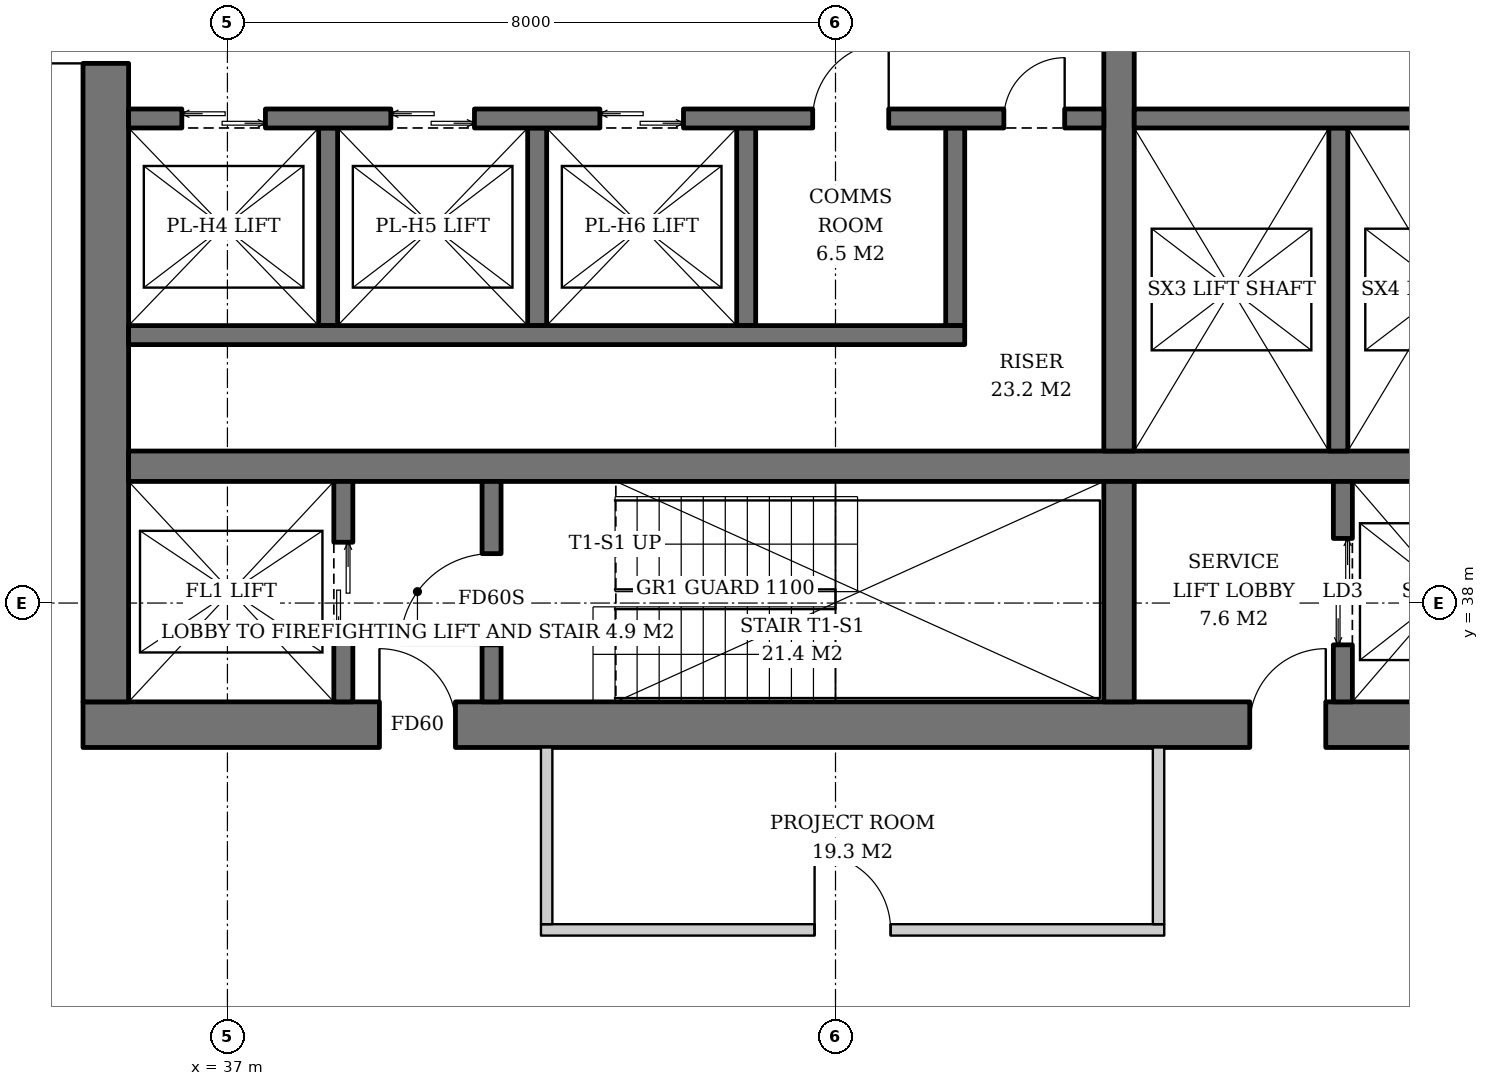
"""IFC4 building model, lengths in metres.
Left out: names, types, materials, properties, quantities, classifications, styles, units other than length and angle.
Written with IfcOpenShell. Run it as: python <this file> out.ifc"""

import sys

from ifc_helpers import new_model, si_unit, direction, frame, frame_2d, origin, place, context, subcontext, project, spatial, rectangle, extrude, element, fill, save


model = new_model("IFC4")
c1 = context("Model", 3, precision=1e-05, world=origin(), true_north=direction((0.0, 1.0)))
c2 = subcontext(c1, "Body", "Model", "MODEL_VIEW")
j1 = project(units=[si_unit("LENGTHUNIT", "METRE"), si_unit("PLANEANGLEUNIT", "RADIAN")], contexts=[c1])
p1 = place(None, origin())
s1 = spatial("IfcSite", under=j1, at=p1, CompositionType="ELEMENT")
p2 = place(p1, origin())
s2 = spatial("IfcBuilding", under=s1, at=p2, CompositionType="ELEMENT")
p3 = place(p2, frame((0.0, 0.0, 211.0)))
s3 = spatial("IfcBuildingStorey", under=s2, at=p3, CompositionType="ELEMENT", Elevation=211.0)
p4 = place(p3, frame((35.1, 36.4, 0.0), z_axis=(0.0, 0.0, 1.0), x_axis=(1.0, 0.0, 0.0)))
e1 = element("IfcWall", 1, at=p4, inside=s3, PredefinedType="SHEAR", context=c2, shape_type="SweptSolid", body=[
    extrude(rectangle(XDim=19.8, YDim=0.6, at=frame_2d((9.9, 0.0))), origin(), (0.0, 0.0, 1.0), 3.8),
])
p5 = place(p4, frame((3.9, 0.0, 0.0)))
e2 = element("IfcOpeningElement", 2, at=p5, cuts=e1, PredefinedType="OPENING", context=c2, shape_type="SweptSolid", body=[
    extrude(rectangle(XDim=1.0, YDim=2.1, at=frame_2d((0.5, 1.05))), frame((0.0, 0.31, 0.0), z_axis=(0.0, -1.0, 0.0), x_axis=(1.0, 0.0, 0.0)), (0.0, 0.0, 1.0), 0.62),
])
p6 = place(p4, frame((15.35, 0.0, 0.0)))
e3 = element("IfcOpeningElement", 3, at=p6, cuts=e1, PredefinedType="OPENING", context=c2, shape_type="SweptSolid", body=[
    extrude(rectangle(XDim=1.0, YDim=2.1, at=frame_2d((0.5, 1.05))), frame((0.0, 0.31, 0.0), z_axis=(0.0, -1.0, 0.0), x_axis=(1.0, 0.0, 0.0)), (0.0, 0.0, 1.0), 0.62),
])
p7 = place(p3, frame((35.4, 36.7, 0.0), z_axis=(0.0, 0.0, 1.0), x_axis=(0.0, 1.0, 0.0)))
e4 = element("IfcWall", 4, at=p7, inside=s3, PredefinedType="SHEAR", context=c2, shape_type="SweptSolid", body=[
    extrude(rectangle(XDim=18.6, YDim=0.6, at=frame_2d((9.3, 0.0))), origin(), (0.0, 0.0, 1.0), 3.8),
])
p8 = place(p7, frame((8.4, 0.0, 0.0)))
e5 = element("IfcOpeningElement", 5, at=p8, cuts=e4, PredefinedType="OPENING", context=c2, shape_type="SweptSolid", body=[
    extrude(rectangle(XDim=1.8, YDim=2.4, at=frame_2d((0.9, 1.2))), frame((0.0, 0.31, 0.0), z_axis=(0.0, -1.0, 0.0), x_axis=(1.0, 0.0, 0.0)), (0.0, 0.0, 1.0), 0.62),
])
p9 = place(p3, frame((35.7, 39.8, 0.0), z_axis=(0.0, 0.0, 1.0), x_axis=(1.0, 0.0, 0.0)))
e6 = element("IfcWall", 6, at=p9, inside=s3, PredefinedType="SHEAR", context=c2, shape_type="SweptSolid", body=[
    extrude(rectangle(XDim=18.6, YDim=0.4, at=frame_2d((9.3, 0.0))), origin(), (0.0, 0.0, 1.0), 3.8),
])
p10 = place(p3, frame((48.73, 36.7, 0.0), z_axis=(0.0, 0.0, 1.0), x_axis=(0.0, 1.0, 0.0)))
e7 = element("IfcWall", 7, at=p10, inside=s3, PredefinedType="SHEAR", context=c2, shape_type="SweptSolid", body=[
    extrude(rectangle(XDim=2.9, YDim=0.4, at=frame_2d((1.45, 0.0))), origin(), (0.0, 0.0, 1.0), 3.8),
])
p11 = place(p3, frame((48.73, 40.0, 0.0), z_axis=(0.0, 0.0, 1.0), x_axis=(0.0, 1.0, 0.0)))
e8 = element("IfcWall", 8, at=p11, inside=s3, PredefinedType="SHEAR", context=c2, shape_type="SweptSolid", body=[
    extrude(rectangle(XDim=12.0, YDim=0.4, at=frame_2d((6.0, 0.0))), origin(), (0.0, 0.0, 1.0), 3.8),
])
p12 = place(p3, frame((38.525, 36.7, 0.0), z_axis=(0.0, 0.0, 1.0), x_axis=(0.0, 1.0, 0.0)))
e9 = element("IfcWall", 9, at=p12, inside=s3, PredefinedType="SHEAR", context=c2, shape_type="SweptSolid", body=[
    extrude(rectangle(XDim=2.9, YDim=0.25, at=frame_2d((1.45, 0.0))), origin(), (0.0, 0.0, 1.0), 3.8),
])
p13 = place(p12, frame((0.8, 0.0, 0.0)))
e10 = element("IfcOpeningElement", 10, at=p13, cuts=e9, PredefinedType="OPENING", context=c2, shape_type="SweptSolid", body=[
    extrude(rectangle(XDim=1.3, YDim=2.2, at=frame_2d((0.65, 1.1))), frame((0.0, 0.135, 0.0), z_axis=(0.0, -1.0, 0.0), x_axis=(1.0, 0.0, 0.0)), (0.0, 0.0, 1.0), 0.27),
])
p14 = place(p3, frame((40.475, 36.7, 0.0), z_axis=(0.0, 0.0, 1.0), x_axis=(0.0, 1.0, 0.0)))
e11 = element("IfcWall", 11, at=p14, inside=s3, PredefinedType="SHEAR", context=c2, shape_type="SweptSolid", body=[
    extrude(rectangle(XDim=2.9, YDim=0.25, at=frame_2d((1.45, 0.0))), origin(), (0.0, 0.0, 1.0), 3.8),
])
p15 = place(p14, frame((0.75, 0.0, 0.0)))
e12 = element("IfcOpeningElement", 12, at=p15, cuts=e11, PredefinedType="OPENING", context=c2, shape_type="SweptSolid", body=[
    extrude(rectangle(XDim=1.2, YDim=2.1, at=frame_2d((0.6, 1.05))), frame((0.0, 0.135, 0.0), z_axis=(0.0, -1.0, 0.0), x_axis=(1.0, 0.0, 0.0)), (0.0, 0.0, 1.0), 0.27),
])
p16 = place(p3, frame((51.675, 36.7, 0.0), z_axis=(0.0, 0.0, 1.0), x_axis=(0.0, 1.0, 0.0)))
e13 = element("IfcWall", 13, at=p16, inside=s3, PredefinedType="SHEAR", context=c2, shape_type="SweptSolid", body=[
    extrude(rectangle(XDim=2.9, YDim=0.25, at=frame_2d((1.45, 0.0))), origin(), (0.0, 0.0, 1.0), 3.8),
])
p17 = place(p16, frame((0.75, 0.0, 0.0)))
e14 = element("IfcOpeningElement", 14, at=p17, cuts=e13, PredefinedType="OPENING", context=c2, shape_type="SweptSolid", body=[
    extrude(rectangle(XDim=1.4, YDim=2.4, at=frame_2d((0.7, 1.2))), frame((0.0, 0.135, 0.0), z_axis=(0.0, -1.0, 0.0), x_axis=(1.0, 0.0, 0.0)), (0.0, 0.0, 1.0), 0.27),
])
for number, where, z_axis, x_axis in (
    (15, (38.325, 44.25, 0.0), (0.0, 0.0, 1.0), (0.0, -1.0, 0.0)),
    (16, (41.075, 44.25, 0.0), (0.0, 0.0, 1.0), (0.0, -1.0, 0.0)),
    (17, (43.825, 44.25, 0.0), (0.0, 0.0, 1.0), (0.0, -1.0, 0.0)),
    (18, (46.575, 44.25, 0.0), (0.0, 0.0, 1.0), (0.0, -1.0, 0.0)),
):
    element("IfcWall", number, at=place(p3, frame(where, z_axis=z_axis, x_axis=x_axis)), inside=s3, PredefinedType="SHEAR", context=c2, shape_type="SweptSolid", body=[
        extrude(rectangle(XDim=2.6, YDim=0.25, at=frame_2d((1.3, 0.0))), origin(), (0.0, 0.0, 1.0), 3.8),
    ])
p18 = place(p3, frame((35.7, 41.525, 0.0), z_axis=(0.0, 0.0, 1.0), x_axis=(1.0, 0.0, 0.0)))
e19 = element("IfcWall", 19, at=p18, inside=s3, PredefinedType="SHEAR", context=c2, shape_type="SweptSolid", body=[
    extrude(rectangle(XDim=11.0, YDim=0.25, at=frame_2d((5.5, 0.0))), origin(), (0.0, 0.0, 1.0), 3.8),
])
p19 = place(p3, frame((35.7, 44.375, 0.0), z_axis=(0.0, 0.0, 1.0), x_axis=(1.0, 0.0, 0.0)))
e20 = element("IfcWall", 20, at=p19, inside=s3, PredefinedType="SHEAR", context=c2, shape_type="SweptSolid", body=[
    extrude(rectangle(XDim=12.83, YDim=0.25, at=frame_2d((6.415, 0.0))), origin(), (0.0, 0.0, 1.0), 3.8),
])
p20 = place(p19, frame((0.7, 0.0, 0.0)))
e21 = element("IfcOpeningElement", 21, at=p20, cuts=e20, PredefinedType="OPENING", context=c2, shape_type="SweptSolid", body=[
    extrude(rectangle(XDim=1.1, YDim=2.2, at=frame_2d((0.55, 1.1))), frame((0.0, 0.135, 0.0), z_axis=(0.0, -1.0, 0.0), x_axis=(1.0, 0.0, 0.0)), (0.0, 0.0, 1.0), 0.27),
])
p21 = place(p19, frame((3.45, 0.0, 0.0)))
e22 = element("IfcOpeningElement", 22, at=p21, cuts=e20, PredefinedType="OPENING", context=c2, shape_type="SweptSolid", body=[
    extrude(rectangle(XDim=1.1, YDim=2.2, at=frame_2d((0.55, 1.1))), frame((0.0, 0.135, 0.0), z_axis=(0.0, -1.0, 0.0), x_axis=(1.0, 0.0, 0.0)), (0.0, 0.0, 1.0), 0.27),
])
p22 = place(p19, frame((6.2, 0.0, 0.0)))
e23 = element("IfcOpeningElement", 23, at=p22, cuts=e20, PredefinedType="OPENING", context=c2, shape_type="SweptSolid", body=[
    extrude(rectangle(XDim=1.1, YDim=2.2, at=frame_2d((0.55, 1.1))), frame((0.0, 0.135, 0.0), z_axis=(0.0, -1.0, 0.0), x_axis=(1.0, 0.0, 0.0)), (0.0, 0.0, 1.0), 0.27),
])
p23 = place(p19, frame((9.0, 0.0, 0.0)))
e24 = element("IfcOpeningElement", 24, at=p23, cuts=e20, PredefinedType="OPENING", context=c2, shape_type="SweptSolid", body=[
    extrude(rectangle(XDim=1.0, YDim=2.1, at=frame_2d((0.5, 1.05))), frame((0.0, 0.135, 0.0), z_axis=(0.0, -1.0, 0.0), x_axis=(1.0, 0.0, 0.0)), (0.0, 0.0, 1.0), 0.27),
])
p24 = place(p19, frame((11.515, 0.0, 0.0)))
e25 = element("IfcOpeningElement", 25, at=p24, cuts=e20, PredefinedType="OPENING", context=c2, shape_type="SweptSolid", body=[
    extrude(rectangle(XDim=0.8, YDim=2.0, at=frame_2d((0.4, 1.0))), frame((0.0, 0.135, 0.0), z_axis=(0.0, -1.0, 0.0), x_axis=(1.0, 0.0, 0.0)), (0.0, 0.0, 1.0), 0.27),
])
p25 = place(p3, frame((51.615, 44.25, 0.0), z_axis=(0.0, 0.0, 1.0), x_axis=(0.0, -1.0, 0.0)))
e26 = element("IfcWall", 26, at=p25, inside=s3, PredefinedType="SHEAR", context=c2, shape_type="SweptSolid", body=[
    extrude(rectangle(XDim=4.25, YDim=0.25, at=frame_2d((2.125, 0.0))), origin(), (0.0, 0.0, 1.0), 3.8),
])
p26 = place(p3, frame((48.93, 44.375, 0.0), z_axis=(0.0, 0.0, 1.0), x_axis=(1.0, 0.0, 0.0)))
e27 = element("IfcWall", 27, at=p26, inside=s3, PredefinedType="SHEAR", context=c2, shape_type="SweptSolid", body=[
    extrude(rectangle(XDim=5.37, YDim=0.25, at=frame_2d((2.685, 0.0))), origin(), (0.0, 0.0, 1.0), 3.8),
])
p27 = place(p3, frame((41.125, 33.7, 0.0), z_axis=(0.0, 0.0, 1.0), x_axis=(1.0, 0.0, 0.0)))
e28 = element("IfcWall", 28, at=p27, inside=s3, PredefinedType="PARTITIONING", context=c2, shape_type="SweptSolid", body=[
    extrude(rectangle(XDim=8.2, YDim=0.15, at=frame_2d((4.1, 0.0))), origin(), (0.0, 0.0, 1.0), 2.867),
])
p28 = place(p27, frame((3.6, 0.0, 0.0)))
e29 = element("IfcOpeningElement", 29, at=p28, cuts=e28, PredefinedType="OPENING", context=c2, shape_type="SweptSolid", body=[
    extrude(rectangle(XDim=1.0, YDim=2.1, at=frame_2d((0.5, 1.05))), frame((0.0, 0.085, 0.0), z_axis=(0.0, -1.0, 0.0), x_axis=(1.0, 0.0, 0.0)), (0.0, 0.0, 1.0), 0.17),
])
for number, where, z_axis, x_axis in (
    (30, (41.2, 36.1, 0.0), (0.0, 0.0, 1.0), (0.0, -1.0, 0.0)),
    (31, (49.25, 36.1, 0.0), (0.0, 0.0, 1.0), (0.0, -1.0, 0.0)),
):
    element("IfcWall", number, at=place(p3, frame(where, z_axis=z_axis, x_axis=x_axis)), inside=s3, PredefinedType="PARTITIONING", context=c2, shape_type="SweptSolid", body=[
        extrude(rectangle(XDim=2.325, YDim=0.15, at=frame_2d((1.163, 0.0))), origin(), (0.0, 0.0, 1.0), 3.62),
    ])
p29 = place(p13, origin())
e32 = element("IfcDoor", 32, at=p29, inside=s3, OperationType="DOUBLE_DOOR_SLIDING", PredefinedType="DOOR", context=c2, shape_type="SweptSolid", body=[
    extrude(rectangle(XDim=1.3, YDim=2.2, at=frame_2d((0.65, 1.1))), frame((0.0, 0.025, 0.0), z_axis=(0.0, -1.0, 0.0), x_axis=(1.0, 0.0, 0.0)), (0.0, 0.0, 1.0), 0.05),
])
fill(e10, e32)
p30 = place(p15, origin())
e33 = element("IfcDoor", 33, at=p30, inside=s3, OperationType="SINGLE_SWING_LEFT", PredefinedType="DOOR", context=c2, shape_type="SweptSolid", body=[
    extrude(rectangle(XDim=1.2, YDim=2.1, at=frame_2d((0.6, 1.05))), frame((0.0, 0.025, 0.0), z_axis=(0.0, -1.0, 0.0), x_axis=(1.0, 0.0, 0.0)), (0.0, 0.0, 1.0), 0.05),
])
fill(e12, e33)
p31 = place(p17, origin())
e34 = element("IfcDoor", 34, at=p31, inside=s3, OperationType="DOUBLE_DOOR_SLIDING", PredefinedType="DOOR", context=c2, shape_type="SweptSolid", body=[
    extrude(rectangle(XDim=1.4, YDim=2.4, at=frame_2d((0.7, 1.2))), frame((0.0, 0.025, 0.0), z_axis=(0.0, -1.0, 0.0), x_axis=(1.0, 0.0, 0.0)), (0.0, 0.0, 1.0), 0.05),
])
fill(e14, e34)
p32 = place(p20, origin())
e35 = element("IfcDoor", 35, at=p32, inside=s3, OperationType="DOUBLE_DOOR_SLIDING", PredefinedType="DOOR", context=c2, shape_type="SweptSolid", body=[
    extrude(rectangle(XDim=1.1, YDim=2.2, at=frame_2d((0.55, 1.1))), frame((0.0, 0.025, 0.0), z_axis=(0.0, -1.0, 0.0), x_axis=(1.0, 0.0, 0.0)), (0.0, 0.0, 1.0), 0.05),
])
fill(e21, e35)
p33 = place(p21, origin())
e36 = element("IfcDoor", 36, at=p33, inside=s3, OperationType="DOUBLE_DOOR_SLIDING", PredefinedType="DOOR", context=c2, shape_type="SweptSolid", body=[
    extrude(rectangle(XDim=1.1, YDim=2.2, at=frame_2d((0.55, 1.1))), frame((0.0, 0.025, 0.0), z_axis=(0.0, -1.0, 0.0), x_axis=(1.0, 0.0, 0.0)), (0.0, 0.0, 1.0), 0.05),
])
fill(e22, e36)
p34 = place(p22, origin())
e37 = element("IfcDoor", 37, at=p34, inside=s3, OperationType="DOUBLE_DOOR_SLIDING", PredefinedType="DOOR", context=c2, shape_type="SweptSolid", body=[
    extrude(rectangle(XDim=1.1, YDim=2.2, at=frame_2d((0.55, 1.1))), frame((0.0, 0.025, 0.0), z_axis=(0.0, -1.0, 0.0), x_axis=(1.0, 0.0, 0.0)), (0.0, 0.0, 1.0), 0.05),
])
fill(e23, e37)
p35 = place(p23, origin())
e38 = element("IfcDoor", 38, at=p35, inside=s3, OperationType="SINGLE_SWING_RIGHT", PredefinedType="DOOR", context=c2, shape_type="SweptSolid", body=[
    extrude(rectangle(XDim=1.0, YDim=2.1, at=frame_2d((0.5, 1.05))), frame((0.0, 0.025, 0.0), z_axis=(0.0, -1.0, 0.0), x_axis=(1.0, 0.0, 0.0)), (0.0, 0.0, 1.0), 0.05),
])
fill(e24, e38)
p36 = place(p24, origin())
e39 = element("IfcDoor", 39, at=p36, inside=s3, OperationType="SINGLE_SWING_RIGHT", PredefinedType="DOOR", context=c2, shape_type="SweptSolid", body=[
    extrude(rectangle(XDim=0.8, YDim=2.0, at=frame_2d((0.4, 1.0))), frame((0.0, 0.025, 0.0), z_axis=(0.0, -1.0, 0.0), x_axis=(1.0, 0.0, 0.0)), (0.0, 0.0, 1.0), 0.05),
])
fill(e25, e39)
p37 = place(p5, origin())
e40 = element("IfcDoor", 40, at=p37, inside=s3, OperationType="SINGLE_SWING_LEFT", PredefinedType="DOOR", context=c2, shape_type="SweptSolid", body=[
    extrude(rectangle(XDim=1.0, YDim=2.1, at=frame_2d((0.5, 1.05))), frame((0.0, 0.025, 0.0), z_axis=(0.0, -1.0, 0.0), x_axis=(1.0, 0.0, 0.0)), (0.0, 0.0, 1.0), 0.05),
])
fill(e2, e40)
p38 = place(p8, origin())
e41 = element("IfcDoor", 41, at=p38, inside=s3, OperationType="DOUBLE_DOOR_SINGLE_SWING", PredefinedType="DOOR", context=c2, shape_type="SweptSolid", body=[
    extrude(rectangle(XDim=1.8, YDim=2.4, at=frame_2d((0.9, 1.2))), frame((0.0, 0.025, 0.0), z_axis=(0.0, -1.0, 0.0), x_axis=(1.0, 0.0, 0.0)), (0.0, 0.0, 1.0), 0.05),
])
fill(e5, e41)
p39 = place(p6, origin())
e42 = element("IfcDoor", 42, at=p39, inside=s3, OperationType="SINGLE_SWING_RIGHT", PredefinedType="DOOR", context=c2, shape_type="SweptSolid", body=[
    extrude(rectangle(XDim=1.0, YDim=2.1, at=frame_2d((0.5, 1.05))), frame((0.0, 0.025, 0.0), z_axis=(0.0, -1.0, 0.0), x_axis=(1.0, 0.0, 0.0)), (0.0, 0.0, 1.0), 0.05),
])
fill(e3, e42)
p40 = place(p28, origin())
e43 = element("IfcDoor", 43, at=p40, inside=s3, OperationType="SINGLE_SWING_LEFT", PredefinedType="DOOR", context=c2, shape_type="SweptSolid", body=[
    extrude(rectangle(XDim=1.0, YDim=2.1, at=frame_2d((0.5, 1.05))), frame((0.0, 0.025, 0.0), z_axis=(0.0, -1.0, 0.0), x_axis=(1.0, 0.0, 0.0)), (0.0, 0.0, 1.0), 0.05),
])
fill(e29, e43)
save(model, sys.argv[1])
